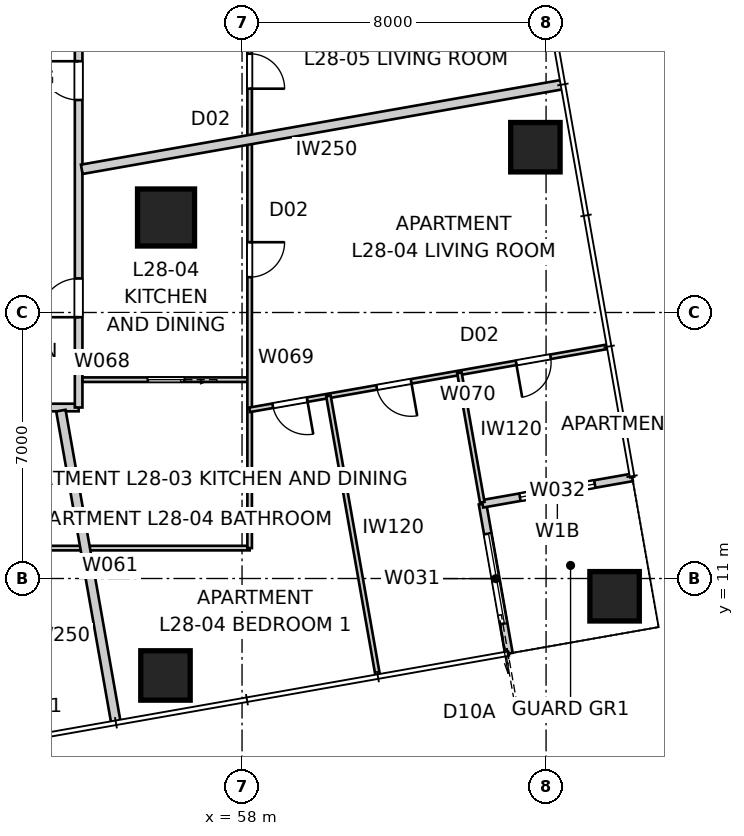
"""IFC4 building model, lengths in metres.
Left out: names, types, materials, properties, quantities, classifications, styles, units other than length and angle.
Written with IfcOpenShell. Run it as: python <this file> out.ifc"""

import sys

from ifc_helpers import new_model, si_unit, direction, frame, frame_2d, origin, origin_2d, place, context, subcontext, project, spatial, rectangle, extrude, element, fill, save


model = new_model("IFC4")
c1 = context("Model", 3, precision=1e-05, world=origin(), true_north=direction((0.0, 1.0)))
c2 = subcontext(c1, "Body", "Model", "MODEL_VIEW")
j1 = project(units=[si_unit("LENGTHUNIT", "METRE"), si_unit("PLANEANGLEUNIT", "RADIAN")], contexts=[c1])
p1 = place(None, origin())
s1 = spatial("IfcSite", under=j1, at=p1, CompositionType="ELEMENT")
p2 = place(p1, origin())
s2 = spatial("IfcBuilding", under=s1, at=p2, CompositionType="ELEMENT")
p3 = place(p2, frame((0.0, 0.0, 103.2)))
s3 = spatial("IfcBuildingStorey", under=s2, at=p3, CompositionType="ELEMENT", Elevation=103.2)
for number, where, z_axis, x_axis in (
    (1, (55.985, 8.448, 0.0), (0.0, 0.0, 1.0), (1.0, 0.0, 0.0)),
    (2, (67.803, 10.532, 0.0), (0.0, 0.0, 1.0), (1.0, 0.0, 0.0)),
    (3, (65.719, 22.35, 0.0), (0.0, 0.0, 1.0), (1.0, 0.0, 0.0)),
):
    element("IfcColumn", number, at=place(p3, frame(where, z_axis=z_axis, x_axis=x_axis)), inside=s3, PredefinedType="COLUMN", context=c2, shape_type="SweptSolid", body=[
        extrude(rectangle(XDim=1.3, YDim=1.3, at=origin_2d()), origin(), (0.0, 0.0, 1.0), 3.2),
    ])
p4 = place(p3, frame((56.0, 20.5, 0.0), z_axis=(0.0, 0.0, 1.0), x_axis=(1.0, 0.0, 0.0)))
e4 = element("IfcColumn", 4, at=p4, inside=s3, PredefinedType="COLUMN", context=c2, shape_type="SweptSolid", body=[
    extrude(rectangle(XDim=1.5, YDim=1.5, at=origin_2d()), origin(), (0.0, 0.0, 1.0), 3.4),
])
p5 = place(p3, frame((65.022, 9.026, 0.0), z_axis=(0.0, 0.0, 1.0), x_axis=(-0.173646056486, 0.984808127031, 0.0)))
e5 = element("IfcWall", 5, at=p5, inside=s3, PredefinedType="SOLIDWALL", context=c2, shape_type="SweptSolid", body=[
    extrude(rectangle(XDim=4.0, YDim=0.2, at=frame_2d((2.0, 0.0))), origin(), (0.0, 0.0, 1.0), 3.2),
])
p6 = place(p5, frame((0.8, 0.0, 0.0)))
e6 = element("IfcOpeningElement", 6, at=p6, cuts=e5, PredefinedType="OPENING", context=c2, shape_type="SweptSolid", body=[
    extrude(rectangle(XDim=2.4, YDim=2.1, at=frame_2d((1.2, 1.05))), frame((0.0, 0.11, 0.0), z_axis=(0.0, -1.0, 0.0), x_axis=(1.0, 0.0, 0.0)), (0.0, 0.0, 1.0), 0.22),
])
p7 = place(p3, frame((64.328, 12.966, 0.0), z_axis=(0.0, 0.0, 1.0), x_axis=(0.984808127031, 0.173646056486, 0.0)))
e7 = element("IfcWall", 7, at=p7, inside=s3, PredefinedType="SOLIDWALL", context=c2, shape_type="SweptSolid", body=[
    extrude(rectangle(XDim=4.0, YDim=0.2, at=frame_2d((2.0, 0.0))), origin(), (0.0, 0.0, 1.0), 3.2),
])
p8 = place(p7, frame((1.0, 0.0, 0.4)))
e8 = element("IfcOpeningElement", 8, at=p8, cuts=e7, PredefinedType="OPENING", context=c2, shape_type="SweptSolid", body=[
    extrude(rectangle(XDim=2.0, YDim=1.8, at=frame_2d((1.0, 0.9))), frame((0.0, 0.11, 0.0), z_axis=(0.0, -1.0, 0.0), x_axis=(1.0, 0.0, 0.0)), (0.0, 0.0, 1.0), 0.22),
])
p9 = place(p3, frame((26.3, 15.5, 0.0), z_axis=(0.0, 0.0, 1.0), x_axis=(1.0, 0.0, 0.0)))
e9 = element("IfcWall", 9, at=p9, inside=s3, PredefinedType="PARTITIONING", context=c2, shape_type="SweptSolid", body=[
    extrude(rectangle(XDim=27.4, YDim=0.2, at=frame_2d((13.7, 0.0))), origin(), (0.0, 0.0, 1.0), 3.2),
])
p10 = place(p9, frame((24.455, 0.0, 0.0)))
e10 = element("IfcOpeningElement", 10, at=p10, cuts=e9, PredefinedType="OPENING", context=c2, shape_type="SweptSolid", body=[
    extrude(rectangle(XDim=1.02, YDim=2.0, at=frame_2d((0.51, 1.0))), frame((0.0, 0.11, 0.0), z_axis=(0.0, -1.0, 0.0), x_axis=(1.0, 0.0, 0.0)), (0.0, 0.0, 1.0), 0.22),
])
p11 = place(p9, frame((1.765, 0.0, 0.0)))
e11 = element("IfcOpeningElement", 11, at=p11, cuts=e9, PredefinedType="OPENING", context=c2, shape_type="SweptSolid", body=[
    extrude(rectangle(XDim=1.02, YDim=2.0, at=frame_2d((0.51, 1.0))), frame((0.0, 0.11, 0.0), z_axis=(0.0, -1.0, 0.0), x_axis=(1.0, 0.0, 0.0)), (0.0, 0.0, 1.0), 0.22),
])
p12 = place(p3, frame((53.7, 15.5, 0.0), z_axis=(0.0, 0.0, 1.0), x_axis=(0.0, 1.0, 0.0)))
e12 = element("IfcWall", 12, at=p12, inside=s3, PredefinedType="PARTITIONING", context=c2, shape_type="SweptSolid", body=[
    extrude(rectangle(XDim=29.0, YDim=0.2, at=frame_2d((14.5, 0.0))), origin(), (0.0, 0.0, 1.0), 3.2),
])
p13 = place(p12, frame((23.648, 0.0, 0.0)))
e13 = element("IfcOpeningElement", 13, at=p13, cuts=e12, PredefinedType="OPENING", context=c2, shape_type="SweptSolid", body=[
    extrude(rectangle(XDim=1.02, YDim=2.34, at=frame_2d((0.51, 1.17))), frame((0.0, 0.11, 0.0), z_axis=(0.0, -1.0, 0.0), x_axis=(1.0, 0.0, 0.0)), (0.0, 0.0, 1.0), 0.22),
])
p14 = place(p12, frame((2.376, 0.0, 0.0)))
e14 = element("IfcOpeningElement", 14, at=p14, cuts=e12, PredefinedType="OPENING", context=c2, shape_type="SweptSolid", body=[
    extrude(rectangle(XDim=1.02, YDim=2.0, at=frame_2d((0.51, 1.0))), frame((0.0, 0.11, 0.0), z_axis=(0.0, -1.0, 0.0), x_axis=(1.0, 0.0, 0.0)), (0.0, 0.0, 1.0), 0.22),
])
p15 = place(p12, frame((8.092, 0.0, 0.0)))
e15 = element("IfcOpeningElement", 15, at=p15, cuts=e12, PredefinedType="OPENING", context=c2, shape_type="SweptSolid", body=[
    extrude(rectangle(XDim=1.02, YDim=2.34, at=frame_2d((0.51, 1.17))), frame((0.0, 0.11, 0.0), z_axis=(0.0, -1.0, 0.0), x_axis=(1.0, 0.0, 0.0)), (0.0, 0.0, 1.0), 0.22),
])
p16 = place(p3, frame((54.682, 7.203, 0.0), z_axis=(0.0, 0.0, 1.0), x_axis=(-0.173651756605, 0.984807121942, 0.0)))
e16 = element("IfcWall", 16, at=p16, inside=s3, PredefinedType="PARTITIONING", context=c2, shape_type="SweptSolid", body=[
    extrude(rectangle(XDim=8.341, YDim=0.25, at=frame_2d((4.171, 0.0))), origin(), (0.0, 0.0, 1.0), 3.2),
])
p17 = place(p3, frame((66.444, 24.001, 0.0), z_axis=(0.0, 0.0, 1.0), x_axis=(-0.984809355703, -0.173639088111, 0.0)))
e17 = element("IfcWall", 17, at=p17, inside=s3, PredefinedType="PARTITIONING", context=c2, shape_type="SweptSolid", body=[
    extrude(rectangle(XDim=12.857, YDim=0.25, at=frame_2d((6.428, 0.0))), origin(), (0.0, 0.0, 1.0), 3.2),
])
p18 = place(p3, frame((58.2, 11.8, 0.0), z_axis=(0.0, 0.0, 1.0), x_axis=(-1.0, 0.0, 0.0)))
e18 = element("IfcWall", 18, at=p18, inside=s3, PredefinedType="PARTITIONING", context=c2, shape_type="SweptSolid", body=[
    extrude(rectangle(XDim=25.653, YDim=0.12, at=frame_2d((12.826, 0.0))), origin(), (0.0, 0.0, 1.0), 3.2),
])
p19 = place(p18, frame((7.342, 0.0, 0.0)))
e19 = element("IfcOpeningElement", 19, at=p19, cuts=e18, PredefinedType="OPENING", context=c2, shape_type="SweptSolid", body=[
    extrude(rectangle(XDim=0.92, YDim=2.34, at=frame_2d((0.46, 1.17))), frame((0.0, 0.07, 0.0), z_axis=(0.0, -1.0, 0.0), x_axis=(1.0, 0.0, 0.0)), (0.0, 0.0, 1.0), 0.14),
])
p20 = place(p18, frame((12.394, 0.0, 0.0)))
e20 = element("IfcOpeningElement", 20, at=p20, cuts=e18, PredefinedType="OPENING", context=c2, shape_type="SweptSolid", body=[
    extrude(rectangle(XDim=0.96, YDim=2.1, at=frame_2d((0.48, 1.05))), frame((0.0, 0.07, 0.0), z_axis=(0.0, -1.0, 0.0), x_axis=(1.0, 0.0, 0.0)), (0.0, 0.0, 1.0), 0.14),
])
p21 = place(p18, frame((16.288, 0.0, 0.0)))
e21 = element("IfcOpeningElement", 21, at=p21, cuts=e18, PredefinedType="OPENING", context=c2, shape_type="SweptSolid", body=[
    extrude(rectangle(XDim=0.96, YDim=2.1, at=frame_2d((0.48, 1.05))), frame((0.0, 0.07, 0.0), z_axis=(0.0, -1.0, 0.0), x_axis=(1.0, 0.0, 0.0)), (0.0, 0.0, 1.0), 0.14),
])
p22 = place(p18, frame((20.134, 0.0, 0.0)))
e22 = element("IfcOpeningElement", 22, at=p22, cuts=e18, PredefinedType="OPENING", context=c2, shape_type="SweptSolid", body=[
    extrude(rectangle(XDim=0.92, YDim=2.34, at=frame_2d((0.46, 1.17))), frame((0.0, 0.07, 0.0), z_axis=(0.0, -1.0, 0.0), x_axis=(1.0, 0.0, 0.0)), (0.0, 0.0, 1.0), 0.14),
])
p23 = place(p3, frame((58.2, 16.232, 0.0), z_axis=(0.0, 0.0, 1.0), x_axis=(-1.0, 0.0, 0.0)))
e23 = element("IfcWall", 23, at=p23, inside=s3, PredefinedType="PARTITIONING", context=c2, shape_type="SweptSolid", body=[
    extrude(rectangle(XDim=4.4, YDim=0.12, at=frame_2d((2.2, 0.0))), origin(), (0.0, 0.0, 1.0), 3.2),
])
p24 = place(p23, frame((1.72, 0.0, 0.0)))
e24 = element("IfcOpeningElement", 24, at=p24, cuts=e23, PredefinedType="OPENING", context=c2, shape_type="SweptSolid", body=[
    extrude(rectangle(XDim=0.96, YDim=2.1, at=frame_2d((0.48, 1.05))), frame((0.0, 0.07, 0.0), z_axis=(0.0, -1.0, 0.0), x_axis=(1.0, 0.0, 0.0)), (0.0, 0.0, 1.0), 0.14),
])
p25 = place(p3, frame((58.2, 48.2, 0.0), z_axis=(0.0, 0.0, 1.0), x_axis=(0.0, -1.0, 0.0)))
e25 = element("IfcWall", 25, at=p25, inside=s3, PredefinedType="PARTITIONING", context=c2, shape_type="SweptSolid", body=[
    extrude(rectangle(XDim=36.4, YDim=0.12, at=frame_2d((18.2, 0.0))), origin(), (0.0, 0.0, 1.0), 3.2),
])
p26 = place(p25, frame((5.671, 0.0, 0.0)))
e26 = element("IfcOpeningElement", 26, at=p26, cuts=e25, PredefinedType="OPENING", context=c2, shape_type="SweptSolid", body=[
    extrude(rectangle(XDim=0.92, YDim=2.34, at=frame_2d((0.46, 1.17))), frame((0.0, 0.07, 0.0), z_axis=(0.0, -1.0, 0.0), x_axis=(1.0, 0.0, 0.0)), (0.0, 0.0, 1.0), 0.14),
])
p27 = place(p25, frame((8.83, 0.0, 0.0)))
e27 = element("IfcOpeningElement", 27, at=p27, cuts=e25, PredefinedType="OPENING", context=c2, shape_type="SweptSolid", body=[
    extrude(rectangle(XDim=0.92, YDim=2.34, at=frame_2d((0.46, 1.17))), frame((0.0, 0.07, 0.0), z_axis=(0.0, -1.0, 0.0), x_axis=(1.0, 0.0, 0.0)), (0.0, 0.0, 1.0), 0.14),
])
p28 = place(p25, frame((28.35, 0.0, 0.0)))
e28 = element("IfcOpeningElement", 28, at=p28, cuts=e25, PredefinedType="OPENING", context=c2, shape_type="SweptSolid", body=[
    extrude(rectangle(XDim=0.92, YDim=2.34, at=frame_2d((0.46, 1.17))), frame((0.0, 0.07, 0.0), z_axis=(0.0, -1.0, 0.0), x_axis=(1.0, 0.0, 0.0)), (0.0, 0.0, 1.0), 0.14),
])
p29 = place(p25, frame((23.39, 0.0, 0.0)))
e29 = element("IfcOpeningElement", 29, at=p29, cuts=e25, PredefinedType="OPENING", context=c2, shape_type="SweptSolid", body=[
    extrude(rectangle(XDim=0.92, YDim=2.34, at=frame_2d((0.46, 1.17))), frame((0.0, 0.07, 0.0), z_axis=(0.0, -1.0, 0.0), x_axis=(1.0, 0.0, 0.0)), (0.0, 0.0, 1.0), 0.14),
])
p30 = place(p25, frame((19.918, 0.0, 0.0)))
e30 = element("IfcOpeningElement", 30, at=p30, cuts=e25, PredefinedType="OPENING", context=c2, shape_type="SweptSolid", body=[
    extrude(rectangle(XDim=0.96, YDim=2.1, at=frame_2d((0.48, 1.05))), frame((0.0, 0.07, 0.0), z_axis=(0.0, -1.0, 0.0), x_axis=(1.0, 0.0, 0.0)), (0.0, 0.0, 1.0), 0.14),
])
p31 = place(p25, frame((16.313, 0.0, 0.0)))
e31 = element("IfcOpeningElement", 31, at=p31, cuts=e25, PredefinedType="OPENING", context=c2, shape_type="SweptSolid", body=[
    extrude(rectangle(XDim=0.96, YDim=2.1, at=frame_2d((0.48, 1.05))), frame((0.0, 0.07, 0.0), z_axis=(0.0, -1.0, 0.0), x_axis=(1.0, 0.0, 0.0)), (0.0, 0.0, 1.0), 0.14),
])
p32 = place(p3, frame((67.62, 17.1, 0.0), z_axis=(0.0, 0.0, 1.0), x_axis=(-0.984808730291, -0.173642635155, 0.0)))
e32 = element("IfcWall", 32, at=p32, inside=s3, PredefinedType="PARTITIONING", context=c2, shape_type="SweptSolid", body=[
    extrude(rectangle(XDim=9.565, YDim=0.12, at=frame_2d((4.782, 0.0))), origin(), (0.0, 0.0, 1.0), 3.2),
])
p33 = place(p32, frame((1.525, 0.0, 0.0)))
e33 = element("IfcOpeningElement", 33, at=p33, cuts=e32, PredefinedType="OPENING", context=c2, shape_type="SweptSolid", body=[
    extrude(rectangle(XDim=0.92, YDim=2.34, at=frame_2d((0.46, 1.17))), frame((0.0, 0.07, 0.0), z_axis=(0.0, -1.0, 0.0), x_axis=(1.0, 0.0, 0.0)), (0.0, 0.0, 1.0), 0.14),
])
p34 = place(p32, frame((5.25, 0.0, 0.0)))
e34 = element("IfcOpeningElement", 34, at=p34, cuts=e32, PredefinedType="OPENING", context=c2, shape_type="SweptSolid", body=[
    extrude(rectangle(XDim=0.92, YDim=2.34, at=frame_2d((0.46, 1.17))), frame((0.0, 0.07, 0.0), z_axis=(0.0, -1.0, 0.0), x_axis=(1.0, 0.0, 0.0)), (0.0, 0.0, 1.0), 0.14),
])
p35 = place(p32, frame((8.028, 0.0, 0.0)))
e35 = element("IfcOpeningElement", 35, at=p35, cuts=e32, PredefinedType="OPENING", context=c2, shape_type="SweptSolid", body=[
    extrude(rectangle(XDim=0.92, YDim=2.0, at=frame_2d((0.46, 1.0))), frame((0.0, 0.07, 0.0), z_axis=(0.0, -1.0, 0.0), x_axis=(1.0, 0.0, 0.0)), (0.0, 0.0, 1.0), 0.14),
])
p36 = place(p3, frame((60.273, 15.805, 0.0), z_axis=(0.0, 0.0, 1.0), x_axis=(0.173647177755, -0.984807929323, 0.0)))
e36 = element("IfcWall", 36, at=p36, inside=s3, PredefinedType="PARTITIONING", context=c2, shape_type="SweptSolid", body=[
    extrude(rectangle(XDim=7.46, YDim=0.12, at=frame_2d((3.73, 0.0))), origin(), (0.0, 0.0, 1.0), 3.2),
])
p37 = place(p3, frame((63.72, 16.412, 0.0), z_axis=(0.0, 0.0, 1.0), x_axis=(0.173660541335, -0.984805572884, 0.0)))
e37 = element("IfcWall", 37, at=p37, inside=s3, PredefinedType="PARTITIONING", context=c2, shape_type="SweptSolid", body=[
    extrude(rectangle(XDim=3.46, YDim=0.12, at=frame_2d((1.73, 0.0))), origin(), (0.0, 0.0, 1.0), 3.2),
])
p38 = place(p6, origin())
e38 = element("IfcDoor", 38, at=p38, inside=s3, OperationType="SLIDING_TO_LEFT", PredefinedType="DOOR", context=c2, shape_type="SweptSolid", body=[
    extrude(rectangle(XDim=2.4, YDim=2.1, at=frame_2d((1.2, 1.05))), frame((0.0, 0.025, 0.0), z_axis=(0.0, -1.0, 0.0), x_axis=(1.0, 0.0, 0.0)), (0.0, 0.0, 1.0), 0.05),
])
fill(e6, e38)
p39 = place(p8, origin())
e39 = element("IfcWindow", 39, at=p39, inside=s3, PartitioningType="SINGLE_PANEL", PredefinedType="WINDOW", context=c2, shape_type="SweptSolid", body=[
    extrude(rectangle(XDim=2.0, YDim=1.8, at=frame_2d((1.0, 0.9))), frame((0.0, 0.03, 0.0), z_axis=(0.0, -1.0, 0.0), x_axis=(1.0, 0.0, 0.0)), (0.0, 0.0, 1.0), 0.06),
])
fill(e8, e39)
p40 = place(p14, origin())
e40 = element("IfcDoor", 40, at=p40, inside=s3, OperationType="SINGLE_SWING_LEFT", PredefinedType="DOOR", context=c2, shape_type="SweptSolid", body=[
    extrude(rectangle(XDim=1.02, YDim=2.0, at=frame_2d((0.51, 1.0))), frame((0.0, 0.025, 0.0), z_axis=(0.0, -1.0, 0.0), x_axis=(1.0, 0.0, 0.0)), (0.0, 0.0, 1.0), 0.05),
])
fill(e14, e40)
p41 = place(p15, origin())
e41 = element("IfcDoor", 41, at=p41, inside=s3, OperationType="SINGLE_SWING_RIGHT", PredefinedType="DOOR", context=c2, shape_type="SweptSolid", body=[
    extrude(rectangle(XDim=1.02, YDim=2.34, at=frame_2d((0.51, 1.17))), frame((0.0, 0.025, 0.0), z_axis=(0.0, -1.0, 0.0), x_axis=(1.0, 0.0, 0.0)), (0.0, 0.0, 1.0), 0.05),
])
fill(e15, e41)
p42 = place(p28, origin())
e42 = element("IfcDoor", 42, at=p42, inside=s3, OperationType="SINGLE_SWING_LEFT", PredefinedType="DOOR", context=c2, shape_type="SweptSolid", body=[
    extrude(rectangle(XDim=0.92, YDim=2.34, at=frame_2d((0.46, 1.17))), frame((0.0, 0.025, 0.0), z_axis=(0.0, -1.0, 0.0), x_axis=(1.0, 0.0, 0.0)), (0.0, 0.0, 1.0), 0.05),
])
fill(e28, e42)
p43 = place(p24, origin())
e43 = element("IfcDoor", 43, at=p43, inside=s3, OperationType="SLIDING_TO_LEFT", PredefinedType="DOOR", context=c2, shape_type="SweptSolid", body=[
    extrude(rectangle(XDim=0.96, YDim=2.1, at=frame_2d((0.48, 1.05))), frame((0.0, 0.025, 0.0), z_axis=(0.0, -1.0, 0.0), x_axis=(1.0, 0.0, 0.0)), (0.0, 0.0, 1.0), 0.05),
])
fill(e24, e43)
p44 = place(p29, origin())
e44 = element("IfcDoor", 44, at=p44, inside=s3, OperationType="SINGLE_SWING_RIGHT", PredefinedType="DOOR", context=c2, shape_type="SweptSolid", body=[
    extrude(rectangle(XDim=0.92, YDim=2.34, at=frame_2d((0.46, 1.17))), frame((0.0, 0.025, 0.0), z_axis=(0.0, -1.0, 0.0), x_axis=(1.0, 0.0, 0.0)), (0.0, 0.0, 1.0), 0.05),
])
fill(e29, e44)
p45 = place(p33, origin())
e45 = element("IfcDoor", 45, at=p45, inside=s3, OperationType="SINGLE_SWING_RIGHT", PredefinedType="DOOR", context=c2, shape_type="SweptSolid", body=[
    extrude(rectangle(XDim=0.92, YDim=2.34, at=frame_2d((0.46, 1.17))), frame((0.0, 0.025, 0.0), z_axis=(0.0, -1.0, 0.0), x_axis=(1.0, 0.0, 0.0)), (0.0, 0.0, 1.0), 0.05),
])
fill(e33, e45)
p46 = place(p34, origin())
e46 = element("IfcDoor", 46, at=p46, inside=s3, OperationType="SINGLE_SWING_LEFT", PredefinedType="DOOR", context=c2, shape_type="SweptSolid", body=[
    extrude(rectangle(XDim=0.92, YDim=2.34, at=frame_2d((0.46, 1.17))), frame((0.0, 0.025, 0.0), z_axis=(0.0, -1.0, 0.0), x_axis=(1.0, 0.0, 0.0)), (0.0, 0.0, 1.0), 0.05),
])
fill(e34, e46)
p47 = place(p35, origin())
e47 = element("IfcDoor", 47, at=p47, inside=s3, OperationType="SINGLE_SWING_LEFT", PredefinedType="DOOR", context=c2, shape_type="SweptSolid", body=[
    extrude(rectangle(XDim=0.92, YDim=2.0, at=frame_2d((0.46, 1.0))), frame((0.0, 0.025, 0.0), z_axis=(0.0, -1.0, 0.0), x_axis=(1.0, 0.0, 0.0)), (0.0, 0.0, 1.0), 0.05),
])
fill(e35, e47)
save(model, sys.argv[1])
